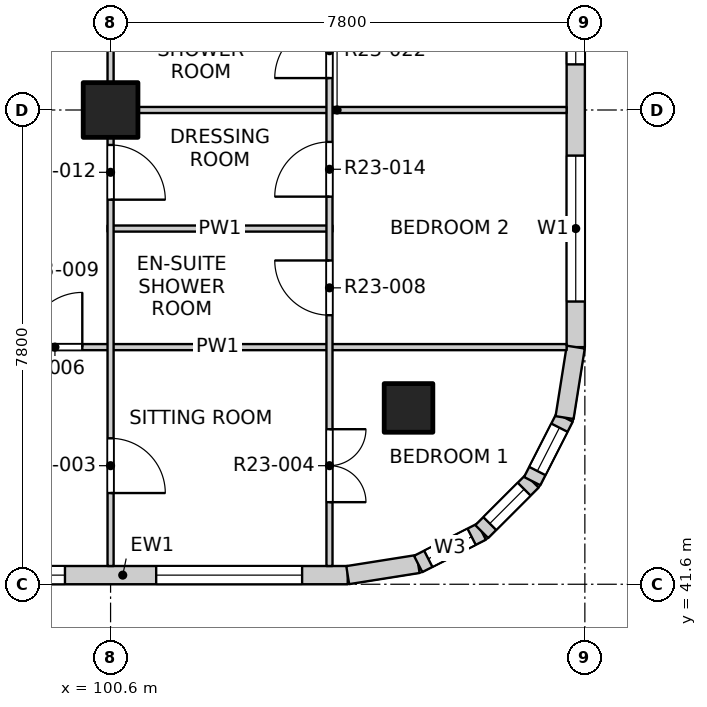
"""IFC4 building model, lengths in metres.
Left out: names, types, materials, properties, quantities, classifications, styles, units other than length and angle.
Written with IfcOpenShell. Run it as: python <this file> out.ifc"""

import sys

from ifc_helpers import new_model, si_unit, direction, frame, frame_2d, origin, origin_2d, place, context, subcontext, project, spatial, rectangle, extrude, element, fill, save


model = new_model("IFC4")
c1 = context("Model", 3, precision=1e-05, world=origin(), true_north=direction((0.0, 1.0)))
c2 = subcontext(c1, "Body", "Model", "MODEL_VIEW")
j1 = project(units=[si_unit("LENGTHUNIT", "METRE"), si_unit("PLANEANGLEUNIT", "RADIAN")], contexts=[c1])
p1 = place(None, origin())
s1 = spatial("IfcSite", under=j1, at=p1, CompositionType="ELEMENT")
p2 = place(p1, origin())
s2 = spatial("IfcBuilding", under=s1, at=p2, CompositionType="ELEMENT")
p3 = place(p2, frame((0.0, 0.0, 238.1)))
s3 = spatial("IfcBuildingStorey", under=s2, at=p3, CompositionType="ELEMENT", Elevation=238.1)
p4 = place(p3, frame((105.5, 44.5, -0.25), z_axis=(0.0, 0.0, 1.0), x_axis=(1.0, 0.0, 0.0)))
e1 = element("IfcColumn", 1, at=p4, inside=s3, PredefinedType="COLUMN", context=c2, shape_type="SweptSolid", body=[
    extrude(rectangle(XDim=0.8, YDim=0.8, at=origin_2d()), origin(), (0.0, 0.0, 1.0), 3.35),
])
p5 = place(p3, frame((100.6, 49.4, -0.25), z_axis=(0.0, 0.0, 1.0), x_axis=(1.0, 0.0, 0.0)))
e2 = element("IfcColumn", 2, at=p5, inside=s3, PredefinedType="COLUMN", context=c2, shape_type="SweptSolid", body=[
    extrude(rectangle(XDim=0.9, YDim=0.9, at=origin_2d()), origin(), (0.0, 0.0, 1.0), 3.35),
])
p6 = place(p3, frame((97.1, 41.75, 0.0), z_axis=(0.0, 0.0, 1.0), x_axis=(1.0, 0.0, 0.0)))
e3 = element("IfcWall", 3, at=p6, inside=s3, PredefinedType="SOLIDWALL", context=c2, shape_type="SweptSolid", body=[
    extrude(rectangle(XDim=7.4, YDim=0.3, at=frame_2d((3.7, 0.0))), origin(), (0.0, 0.0, 1.0), 3.1),
])
p7 = place(p6, frame((0.35, 0.0, 0.9)))
e4 = element("IfcOpeningElement", 4, at=p7, cuts=e3, PredefinedType="OPENING", context=c2, shape_type="SweptSolid", body=[
    extrude(rectangle(XDim=2.4, YDim=1.8, at=frame_2d((1.2, 0.9))), frame((0.0, 0.16, 0.0), z_axis=(0.0, -1.0, 0.0), x_axis=(1.0, 0.0, 0.0)), (0.0, 0.0, 1.0), 0.32),
])
p8 = place(p6, frame((4.25, 0.0, 0.9)))
e5 = element("IfcOpeningElement", 5, at=p8, cuts=e3, PredefinedType="OPENING", context=c2, shape_type="SweptSolid", body=[
    extrude(rectangle(XDim=2.4, YDim=1.8, at=frame_2d((1.2, 0.9))), frame((0.0, 0.16, 0.0), z_axis=(0.0, -1.0, 0.0), x_axis=(1.0, 0.0, 0.0)), (0.0, 0.0, 1.0), 0.32),
])
p9 = place(p3, frame((108.25, 45.5, 0.0), z_axis=(0.0, 0.0, 1.0), x_axis=(0.0, 1.0, 0.0)))
e6 = element("IfcWall", 6, at=p9, inside=s3, PredefinedType="SOLIDWALL", context=c2, shape_type="SweptSolid", body=[
    extrude(rectangle(XDim=7.4, YDim=0.3, at=frame_2d((3.7, 0.0))), origin(), (0.0, 0.0, 1.0), 3.1),
])
p10 = place(p9, frame((0.75, 0.0, 0.9)))
e7 = element("IfcOpeningElement", 7, at=p10, cuts=e6, PredefinedType="OPENING", context=c2, shape_type="SweptSolid", body=[
    extrude(rectangle(XDim=2.4, YDim=1.8, at=frame_2d((1.2, 0.9))), frame((0.0, 0.16, 0.0), z_axis=(0.0, -1.0, 0.0), x_axis=(1.0, 0.0, 0.0)), (0.0, 0.0, 1.0), 0.32),
])
p11 = place(p9, frame((4.65, 0.0, 0.9)))
e8 = element("IfcOpeningElement", 8, at=p11, cuts=e6, PredefinedType="OPENING", context=c2, shape_type="SweptSolid", body=[
    extrude(rectangle(XDim=2.4, YDim=1.8, at=frame_2d((1.2, 0.9))), frame((0.0, 0.16, 0.0), z_axis=(0.0, -1.0, 0.0), x_axis=(1.0, 0.0, 0.0)), (0.0, 0.0, 1.0), 0.32),
])
p12 = place(p3, frame((104.5, 41.75, 0.0), z_axis=(0.0, 0.0, 1.0), x_axis=(0.987678452879, 0.156496880861, 0.0)))
e9 = element("IfcWall", 9, at=p12, inside=s3, PredefinedType="SOLIDWALL", context=c2, shape_type="SweptSolid", body=[
    extrude(rectangle(XDim=1.173, YDim=0.3, at=frame_2d((0.586, 0.0))), origin(), (0.0, 0.0, 1.0), 3.1),
])
p13 = place(p3, frame((105.659, 41.934, 0.0), z_axis=(0.0, 0.0, 1.0), x_axis=(0.890988677504, 0.454025524128, 0.0)))
e10 = element("IfcWall", 10, at=p13, inside=s3, PredefinedType="SOLIDWALL", context=c2, shape_type="SweptSolid", body=[
    extrude(rectangle(XDim=1.173, YDim=0.3, at=frame_2d((0.587, 0.0))), origin(), (0.0, 0.0, 1.0), 3.1),
])
p14 = place(p13, frame((0.187, 0.0, 0.9)))
e11 = element("IfcOpeningElement", 11, at=p14, cuts=e10, PredefinedType="OPENING", context=c2, shape_type="SweptSolid", body=[
    extrude(rectangle(XDim=0.8, YDim=1.2, at=frame_2d((0.4, 0.6))), frame((0.0, 0.16, 0.0), z_axis=(0.0, -1.0, 0.0), x_axis=(1.0, 0.0, 0.0)), (0.0, 0.0, 1.0), 0.32),
])
p15 = place(p3, frame((106.704, 42.466, 0.0), z_axis=(0.0, 0.0, 1.0), x_axis=(0.707106781187, 0.707106781187, 0.0)))
e12 = element("IfcWall", 12, at=p15, inside=s3, PredefinedType="SOLIDWALL", context=c2, shape_type="SweptSolid", body=[
    extrude(rectangle(XDim=1.173, YDim=0.3, at=frame_2d((0.586, 0.0))), origin(), (0.0, 0.0, 1.0), 3.1),
])
p16 = place(p15, frame((0.187, 0.0, 0.9)))
e13 = element("IfcOpeningElement", 13, at=p16, cuts=e12, PredefinedType="OPENING", context=c2, shape_type="SweptSolid", body=[
    extrude(rectangle(XDim=0.8, YDim=1.2, at=frame_2d((0.4, 0.6))), frame((0.0, 0.16, 0.0), z_axis=(0.0, -1.0, 0.0), x_axis=(1.0, 0.0, 0.0)), (0.0, 0.0, 1.0), 0.32),
])
p17 = place(p3, frame((107.534, 43.296, 0.0), z_axis=(0.0, 0.0, 1.0), x_axis=(0.454025524128, 0.890988677504, 0.0)))
e14 = element("IfcWall", 14, at=p17, inside=s3, PredefinedType="SOLIDWALL", context=c2, shape_type="SweptSolid", body=[
    extrude(rectangle(XDim=1.173, YDim=0.3, at=frame_2d((0.587, 0.0))), origin(), (0.0, 0.0, 1.0), 3.1),
])
p18 = place(p17, frame((0.187, 0.0, 0.9)))
e15 = element("IfcOpeningElement", 15, at=p18, cuts=e14, PredefinedType="OPENING", context=c2, shape_type="SweptSolid", body=[
    extrude(rectangle(XDim=0.8, YDim=1.2, at=frame_2d((0.4, 0.6))), frame((0.0, 0.16, 0.0), z_axis=(0.0, -1.0, 0.0), x_axis=(1.0, 0.0, 0.0)), (0.0, 0.0, 1.0), 0.32),
])
p19 = place(p3, frame((108.066, 44.341, 0.0), z_axis=(0.0, 0.0, 1.0), x_axis=(0.156496880861, 0.987678452879, 0.0)))
e16 = element("IfcWall", 16, at=p19, inside=s3, PredefinedType="SOLIDWALL", context=c2, shape_type="SweptSolid", body=[
    extrude(rectangle(XDim=1.173, YDim=0.3, at=frame_2d((0.586, 0.0))), origin(), (0.0, 0.0, 1.0), 3.1),
])
p20 = place(p3, frame((96.625, 45.5, 0.0), z_axis=(0.0, 0.0, 1.0), x_axis=(1.0, 0.0, 0.0)))
e17 = element("IfcWall", 17, at=p20, inside=s3, PredefinedType="PARTITIONING", context=c2, shape_type="SweptSolid", body=[
    extrude(rectangle(XDim=11.475, YDim=0.1, at=frame_2d((5.738, 0.0))), origin(), (0.0, 0.0, 1.0), 3.1),
])
p21 = place(p20, frame((2.61, 0.0, 0.0)))
e18 = element("IfcOpeningElement", 18, at=p21, cuts=e17, PredefinedType="OPENING", context=c2, shape_type="SweptSolid", body=[
    extrude(rectangle(XDim=0.9, YDim=2.1, at=frame_2d((0.45, 1.05))), frame((0.0, 0.06, 0.0), z_axis=(0.0, -1.0, 0.0), x_axis=(1.0, 0.0, 0.0)), (0.0, 0.0, 1.0), 0.12),
])
p22 = place(p3, frame((100.55, 47.45, 0.0), z_axis=(0.0, 0.0, 1.0), x_axis=(1.0, 0.0, 0.0)))
e19 = element("IfcWall", 19, at=p22, inside=s3, PredefinedType="PARTITIONING", context=c2, shape_type="SweptSolid", body=[
    extrude(rectangle(XDim=3.7, YDim=0.1, at=frame_2d((1.85, 0.0))), origin(), (0.0, 0.0, 1.0), 3.1),
])
p23 = place(p3, frame((100.55, 49.4, 0.0), z_axis=(0.0, 0.0, 1.0), x_axis=(1.0, 0.0, 0.0)))
e20 = element("IfcWall", 20, at=p23, inside=s3, PredefinedType="PARTITIONING", context=c2, shape_type="SweptSolid", body=[
    extrude(rectangle(XDim=7.55, YDim=0.1, at=frame_2d((3.775, 0.0))), origin(), (0.0, 0.0, 1.0), 3.1),
])
p24 = place(p3, frame((100.6, 41.9, 0.0), z_axis=(0.0, 0.0, 1.0), x_axis=(0.0, 1.0, 0.0)))
e21 = element("IfcWall", 21, at=p24, inside=s3, PredefinedType="PARTITIONING", context=c2, shape_type="SweptSolid", body=[
    extrude(rectangle(XDim=46.2, YDim=0.1, at=frame_2d((23.1, 0.0))), origin(), (0.0, 0.0, 1.0), 3.1),
])
p25 = place(p24, frame((1.2, 0.0, 0.0)))
e22 = element("IfcOpeningElement", 22, at=p25, cuts=e21, PredefinedType="OPENING", context=c2, shape_type="SweptSolid", body=[
    extrude(rectangle(XDim=0.9, YDim=2.1, at=frame_2d((0.45, 1.05))), frame((0.0, 0.06, 0.0), z_axis=(0.0, -1.0, 0.0), x_axis=(1.0, 0.0, 0.0)), (0.0, 0.0, 1.0), 0.12),
])
p26 = place(p24, frame((6.025, 0.0, 0.0)))
e23 = element("IfcOpeningElement", 23, at=p26, cuts=e21, PredefinedType="OPENING", context=c2, shape_type="SweptSolid", body=[
    extrude(rectangle(XDim=0.9, YDim=2.1, at=frame_2d((0.45, 1.05))), frame((0.0, 0.06, 0.0), z_axis=(0.0, -1.0, 0.0), x_axis=(1.0, 0.0, 0.0)), (0.0, 0.0, 1.0), 0.12),
])
p27 = place(p24, frame((9.975, 0.0, 0.0)))
e24 = element("IfcOpeningElement", 24, at=p27, cuts=e21, PredefinedType="OPENING", context=c2, shape_type="SweptSolid", body=[
    extrude(rectangle(XDim=0.9, YDim=2.1, at=frame_2d((0.45, 1.05))), frame((0.0, 0.06, 0.0), z_axis=(0.0, -1.0, 0.0), x_axis=(1.0, 0.0, 0.0)), (0.0, 0.0, 1.0), 0.12),
])
p28 = place(p24, frame((12.9, 0.0, 0.0)))
e25 = element("IfcOpeningElement", 25, at=p28, cuts=e21, PredefinedType="OPENING", context=c2, shape_type="SweptSolid", body=[
    extrude(rectangle(XDim=0.9, YDim=2.1, at=frame_2d((0.45, 1.05))), frame((0.0, 0.06, 0.0), z_axis=(0.0, -1.0, 0.0), x_axis=(1.0, 0.0, 0.0)), (0.0, 0.0, 1.0), 0.12),
])
p29 = place(p24, frame((17.775, 0.0, 0.0)))
e26 = element("IfcOpeningElement", 26, at=p29, cuts=e21, PredefinedType="OPENING", context=c2, shape_type="SweptSolid", body=[
    extrude(rectangle(XDim=0.9, YDim=2.1, at=frame_2d((0.45, 1.05))), frame((0.0, 0.06, 0.0), z_axis=(0.0, -1.0, 0.0), x_axis=(1.0, 0.0, 0.0)), (0.0, 0.0, 1.0), 0.12),
])
p30 = place(p24, frame((21.625, 0.0, 0.0)))
e27 = element("IfcOpeningElement", 27, at=p30, cuts=e21, PredefinedType="OPENING", context=c2, shape_type="SweptSolid", body=[
    extrude(rectangle(XDim=0.9, YDim=2.1, at=frame_2d((0.45, 1.05))), frame((0.0, 0.06, 0.0), z_axis=(0.0, -1.0, 0.0), x_axis=(1.0, 0.0, 0.0)), (0.0, 0.0, 1.0), 0.12),
])
p31 = place(p24, frame((25.575, 0.0, 0.0)))
e28 = element("IfcOpeningElement", 28, at=p31, cuts=e21, PredefinedType="OPENING", context=c2, shape_type="SweptSolid", body=[
    extrude(rectangle(XDim=0.9, YDim=2.1, at=frame_2d((0.45, 1.05))), frame((0.0, 0.06, 0.0), z_axis=(0.0, -1.0, 0.0), x_axis=(1.0, 0.0, 0.0)), (0.0, 0.0, 1.0), 0.12),
])
p32 = place(p24, frame((28.5, 0.0, 0.0)))
e29 = element("IfcOpeningElement", 29, at=p32, cuts=e21, PredefinedType="OPENING", context=c2, shape_type="SweptSolid", body=[
    extrude(rectangle(XDim=0.9, YDim=2.1, at=frame_2d((0.45, 1.05))), frame((0.0, 0.06, 0.0), z_axis=(0.0, -1.0, 0.0), x_axis=(1.0, 0.0, 0.0)), (0.0, 0.0, 1.0), 0.12),
])
p33 = place(p24, frame((33.375, 0.0, 0.0)))
e30 = element("IfcOpeningElement", 30, at=p33, cuts=e21, PredefinedType="OPENING", context=c2, shape_type="SweptSolid", body=[
    extrude(rectangle(XDim=0.9, YDim=2.1, at=frame_2d((0.45, 1.05))), frame((0.0, 0.06, 0.0), z_axis=(0.0, -1.0, 0.0), x_axis=(1.0, 0.0, 0.0)), (0.0, 0.0, 1.0), 0.12),
])
p34 = place(p24, frame((36.3, 0.0, 0.0)))
e31 = element("IfcOpeningElement", 31, at=p34, cuts=e21, PredefinedType="OPENING", context=c2, shape_type="SweptSolid", body=[
    extrude(rectangle(XDim=0.9, YDim=2.1, at=frame_2d((0.45, 1.05))), frame((0.0, 0.06, 0.0), z_axis=(0.0, -1.0, 0.0), x_axis=(1.0, 0.0, 0.0)), (0.0, 0.0, 1.0), 0.12),
])
p35 = place(p24, frame((40.2, 0.0, 0.0)))
e32 = element("IfcOpeningElement", 32, at=p35, cuts=e21, PredefinedType="OPENING", context=c2, shape_type="SweptSolid", body=[
    extrude(rectangle(XDim=0.9, YDim=2.1, at=frame_2d((0.45, 1.05))), frame((0.0, 0.06, 0.0), z_axis=(0.0, -1.0, 0.0), x_axis=(1.0, 0.0, 0.0)), (0.0, 0.0, 1.0), 0.12),
])
p36 = place(p24, frame((44.1, 0.0, 0.0)))
e33 = element("IfcOpeningElement", 33, at=p36, cuts=e21, PredefinedType="OPENING", context=c2, shape_type="SweptSolid", body=[
    extrude(rectangle(XDim=0.9, YDim=2.1, at=frame_2d((0.45, 1.05))), frame((0.0, 0.06, 0.0), z_axis=(0.0, -1.0, 0.0), x_axis=(1.0, 0.0, 0.0)), (0.0, 0.0, 1.0), 0.12),
])
p37 = place(p3, frame((104.2, 41.9, 0.0), z_axis=(0.0, 0.0, 1.0), x_axis=(0.0, 1.0, 0.0)))
e34 = element("IfcWall", 34, at=p37, inside=s3, PredefinedType="PARTITIONING", context=c2, shape_type="SweptSolid", body=[
    extrude(rectangle(XDim=19.1, YDim=0.1, at=frame_2d((9.55, 0.0))), origin(), (0.0, 0.0, 1.0), 3.1),
])
p38 = place(p37, frame((1.05, 0.0, 0.0)))
e35 = element("IfcOpeningElement", 35, at=p38, cuts=e34, PredefinedType="OPENING", context=c2, shape_type="SweptSolid", body=[
    extrude(rectangle(XDim=1.2, YDim=2.1, at=frame_2d((0.6, 1.05))), frame((0.0, 0.06, 0.0), z_axis=(0.0, -1.0, 0.0), x_axis=(1.0, 0.0, 0.0)), (0.0, 0.0, 1.0), 0.12),
])
p39 = place(p37, frame((4.125, 0.0, 0.0)))
e36 = element("IfcOpeningElement", 36, at=p39, cuts=e34, PredefinedType="OPENING", context=c2, shape_type="SweptSolid", body=[
    extrude(rectangle(XDim=0.9, YDim=2.1, at=frame_2d((0.45, 1.05))), frame((0.0, 0.06, 0.0), z_axis=(0.0, -1.0, 0.0), x_axis=(1.0, 0.0, 0.0)), (0.0, 0.0, 1.0), 0.12),
])
p40 = place(p37, frame((6.075, 0.0, 0.0)))
e37 = element("IfcOpeningElement", 37, at=p40, cuts=e34, PredefinedType="OPENING", context=c2, shape_type="SweptSolid", body=[
    extrude(rectangle(XDim=0.9, YDim=2.1, at=frame_2d((0.45, 1.05))), frame((0.0, 0.06, 0.0), z_axis=(0.0, -1.0, 0.0), x_axis=(1.0, 0.0, 0.0)), (0.0, 0.0, 1.0), 0.12),
])
p41 = place(p37, frame((8.025, 0.0, 0.0)))
e38 = element("IfcOpeningElement", 38, at=p41, cuts=e34, PredefinedType="OPENING", context=c2, shape_type="SweptSolid", body=[
    extrude(rectangle(XDim=0.9, YDim=2.1, at=frame_2d((0.45, 1.05))), frame((0.0, 0.06, 0.0), z_axis=(0.0, -1.0, 0.0), x_axis=(1.0, 0.0, 0.0)), (0.0, 0.0, 1.0), 0.12),
])
p42 = place(p37, frame((9.975, 0.0, 0.0)))
e39 = element("IfcOpeningElement", 39, at=p42, cuts=e34, PredefinedType="OPENING", context=c2, shape_type="SweptSolid", body=[
    extrude(rectangle(XDim=0.9, YDim=2.1, at=frame_2d((0.45, 1.05))), frame((0.0, 0.06, 0.0), z_axis=(0.0, -1.0, 0.0), x_axis=(1.0, 0.0, 0.0)), (0.0, 0.0, 1.0), 0.12),
])
p43 = place(p37, frame((12.75, 0.0, 0.0)))
e40 = element("IfcOpeningElement", 40, at=p43, cuts=e34, PredefinedType="OPENING", context=c2, shape_type="SweptSolid", body=[
    extrude(rectangle(XDim=1.2, YDim=2.1, at=frame_2d((0.6, 1.05))), frame((0.0, 0.06, 0.0), z_axis=(0.0, -1.0, 0.0), x_axis=(1.0, 0.0, 0.0)), (0.0, 0.0, 1.0), 0.12),
])
p44 = place(p37, frame((15.825, 0.0, 0.0)))
e41 = element("IfcOpeningElement", 41, at=p44, cuts=e34, PredefinedType="OPENING", context=c2, shape_type="SweptSolid", body=[
    extrude(rectangle(XDim=0.9, YDim=2.1, at=frame_2d((0.45, 1.05))), frame((0.0, 0.06, 0.0), z_axis=(0.0, -1.0, 0.0), x_axis=(1.0, 0.0, 0.0)), (0.0, 0.0, 1.0), 0.12),
])
p45 = place(p37, frame((17.775, 0.0, 0.0)))
e42 = element("IfcOpeningElement", 42, at=p45, cuts=e34, PredefinedType="OPENING", context=c2, shape_type="SweptSolid", body=[
    extrude(rectangle(XDim=0.9, YDim=2.1, at=frame_2d((0.45, 1.05))), frame((0.0, 0.06, 0.0), z_axis=(0.0, -1.0, 0.0), x_axis=(1.0, 0.0, 0.0)), (0.0, 0.0, 1.0), 0.12),
])
p46 = place(p7, origin())
e43 = element("IfcWindow", 43, at=p46, inside=s3, PartitioningType="DOUBLE_PANEL_VERTICAL", PredefinedType="WINDOW", context=c2, shape_type="SweptSolid", body=[
    extrude(rectangle(XDim=2.4, YDim=1.8, at=frame_2d((1.2, 0.9))), frame((0.0, 0.03, 0.0), z_axis=(0.0, -1.0, 0.0), x_axis=(1.0, 0.0, 0.0)), (0.0, 0.0, 1.0), 0.06),
])
fill(e4, e43)
p47 = place(p8, origin())
e44 = element("IfcWindow", 44, at=p47, inside=s3, PartitioningType="DOUBLE_PANEL_VERTICAL", PredefinedType="WINDOW", context=c2, shape_type="SweptSolid", body=[
    extrude(rectangle(XDim=2.4, YDim=1.8, at=frame_2d((1.2, 0.9))), frame((0.0, 0.03, 0.0), z_axis=(0.0, -1.0, 0.0), x_axis=(1.0, 0.0, 0.0)), (0.0, 0.0, 1.0), 0.06),
])
fill(e5, e44)
p48 = place(p10, origin())
e45 = element("IfcWindow", 45, at=p48, inside=s3, PartitioningType="DOUBLE_PANEL_VERTICAL", PredefinedType="WINDOW", context=c2, shape_type="SweptSolid", body=[
    extrude(rectangle(XDim=2.4, YDim=1.8, at=frame_2d((1.2, 0.9))), frame((0.0, 0.03, 0.0), z_axis=(0.0, -1.0, 0.0), x_axis=(1.0, 0.0, 0.0)), (0.0, 0.0, 1.0), 0.06),
])
fill(e7, e45)
p49 = place(p11, origin())
e46 = element("IfcWindow", 46, at=p49, inside=s3, PartitioningType="DOUBLE_PANEL_VERTICAL", PredefinedType="WINDOW", context=c2, shape_type="SweptSolid", body=[
    extrude(rectangle(XDim=2.4, YDim=1.8, at=frame_2d((1.2, 0.9))), frame((0.0, 0.03, 0.0), z_axis=(0.0, -1.0, 0.0), x_axis=(1.0, 0.0, 0.0)), (0.0, 0.0, 1.0), 0.06),
])
fill(e8, e46)
p50 = place(p14, origin())
e47 = element("IfcWindow", 47, at=p50, inside=s3, PartitioningType="SINGLE_PANEL", PredefinedType="WINDOW", context=c2, shape_type="SweptSolid", body=[
    extrude(rectangle(XDim=0.8, YDim=1.2, at=frame_2d((0.4, 0.6))), frame((0.0, 0.03, 0.0), z_axis=(0.0, -1.0, 0.0), x_axis=(1.0, 0.0, 0.0)), (0.0, 0.0, 1.0), 0.06),
])
fill(e11, e47)
p51 = place(p16, origin())
e48 = element("IfcWindow", 48, at=p51, inside=s3, PartitioningType="SINGLE_PANEL", PredefinedType="WINDOW", context=c2, shape_type="SweptSolid", body=[
    extrude(rectangle(XDim=0.8, YDim=1.2, at=frame_2d((0.4, 0.6))), frame((0.0, 0.03, 0.0), z_axis=(0.0, -1.0, 0.0), x_axis=(1.0, 0.0, 0.0)), (0.0, 0.0, 1.0), 0.06),
])
fill(e13, e48)
p52 = place(p18, origin())
e49 = element("IfcWindow", 49, at=p52, inside=s3, PartitioningType="SINGLE_PANEL", PredefinedType="WINDOW", context=c2, shape_type="SweptSolid", body=[
    extrude(rectangle(XDim=0.8, YDim=1.2, at=frame_2d((0.4, 0.6))), frame((0.0, 0.03, 0.0), z_axis=(0.0, -1.0, 0.0), x_axis=(1.0, 0.0, 0.0)), (0.0, 0.0, 1.0), 0.06),
])
fill(e15, e49)
p53 = place(p25, origin())
e50 = element("IfcDoor", 50, at=p53, inside=s3, OperationType="SINGLE_SWING_RIGHT", PredefinedType="DOOR", context=c2, shape_type="SweptSolid", body=[
    extrude(rectangle(XDim=0.9, YDim=2.1, at=frame_2d((0.45, 1.05))), frame((0.0, 0.025, 0.0), z_axis=(0.0, -1.0, 0.0), x_axis=(1.0, 0.0, 0.0)), (0.0, 0.0, 1.0), 0.05),
])
fill(e22, e50)
p54 = place(p38, origin())
e51 = element("IfcDoor", 51, at=p54, inside=s3, OperationType="DOUBLE_DOOR_SINGLE_SWING", PredefinedType="DOOR", context=c2, shape_type="SweptSolid", body=[
    extrude(rectangle(XDim=1.2, YDim=2.1, at=frame_2d((0.6, 1.05))), frame((0.0, 0.025, 0.0), z_axis=(0.0, -1.0, 0.0), x_axis=(1.0, 0.0, 0.0)), (0.0, 0.0, 1.0), 0.05),
])
fill(e35, e51)
p55 = place(p21, origin())
e52 = element("IfcDoor", 52, at=p55, inside=s3, OperationType="SINGLE_SWING_RIGHT", PredefinedType="DOOR", context=c2, shape_type="SweptSolid", body=[
    extrude(rectangle(XDim=0.9, YDim=2.1, at=frame_2d((0.45, 1.05))), frame((0.0, 0.025, 0.0), z_axis=(0.0, -1.0, 0.0), x_axis=(1.0, 0.0, 0.0)), (0.0, 0.0, 1.0), 0.05),
])
fill(e18, e52)
p56 = place(p39, origin())
e53 = element("IfcDoor", 53, at=p56, inside=s3, OperationType="SINGLE_SWING_RIGHT", PredefinedType="DOOR", context=c2, shape_type="SweptSolid", body=[
    extrude(rectangle(XDim=0.9, YDim=2.1, at=frame_2d((0.45, 1.05))), frame((0.0, 0.025, 0.0), z_axis=(0.0, -1.0, 0.0), x_axis=(1.0, 0.0, 0.0)), (0.0, 0.0, 1.0), 0.05),
])
fill(e36, e53)
p57 = place(p26, origin())
e54 = element("IfcDoor", 54, at=p57, inside=s3, OperationType="SINGLE_SWING_RIGHT", PredefinedType="DOOR", context=c2, shape_type="SweptSolid", body=[
    extrude(rectangle(XDim=0.9, YDim=2.1, at=frame_2d((0.45, 1.05))), frame((0.0, 0.025, 0.0), z_axis=(0.0, -1.0, 0.0), x_axis=(1.0, 0.0, 0.0)), (0.0, 0.0, 1.0), 0.05),
])
fill(e23, e54)
p58 = place(p40, origin())
e55 = element("IfcDoor", 55, at=p58, inside=s3, OperationType="SINGLE_SWING_LEFT", PredefinedType="DOOR", context=c2, shape_type="SweptSolid", body=[
    extrude(rectangle(XDim=0.9, YDim=2.1, at=frame_2d((0.45, 1.05))), frame((0.0, 0.025, 0.0), z_axis=(0.0, -1.0, 0.0), x_axis=(1.0, 0.0, 0.0)), (0.0, 0.0, 1.0), 0.05),
])
fill(e37, e55)
p59 = place(p41, origin())
e56 = element("IfcDoor", 56, at=p59, inside=s3, OperationType="SINGLE_SWING_LEFT", PredefinedType="DOOR", context=c2, shape_type="SweptSolid", body=[
    extrude(rectangle(XDim=0.9, YDim=2.1, at=frame_2d((0.45, 1.05))), frame((0.0, 0.025, 0.0), z_axis=(0.0, -1.0, 0.0), x_axis=(1.0, 0.0, 0.0)), (0.0, 0.0, 1.0), 0.05),
])
fill(e38, e56)
save(model, sys.argv[1])
